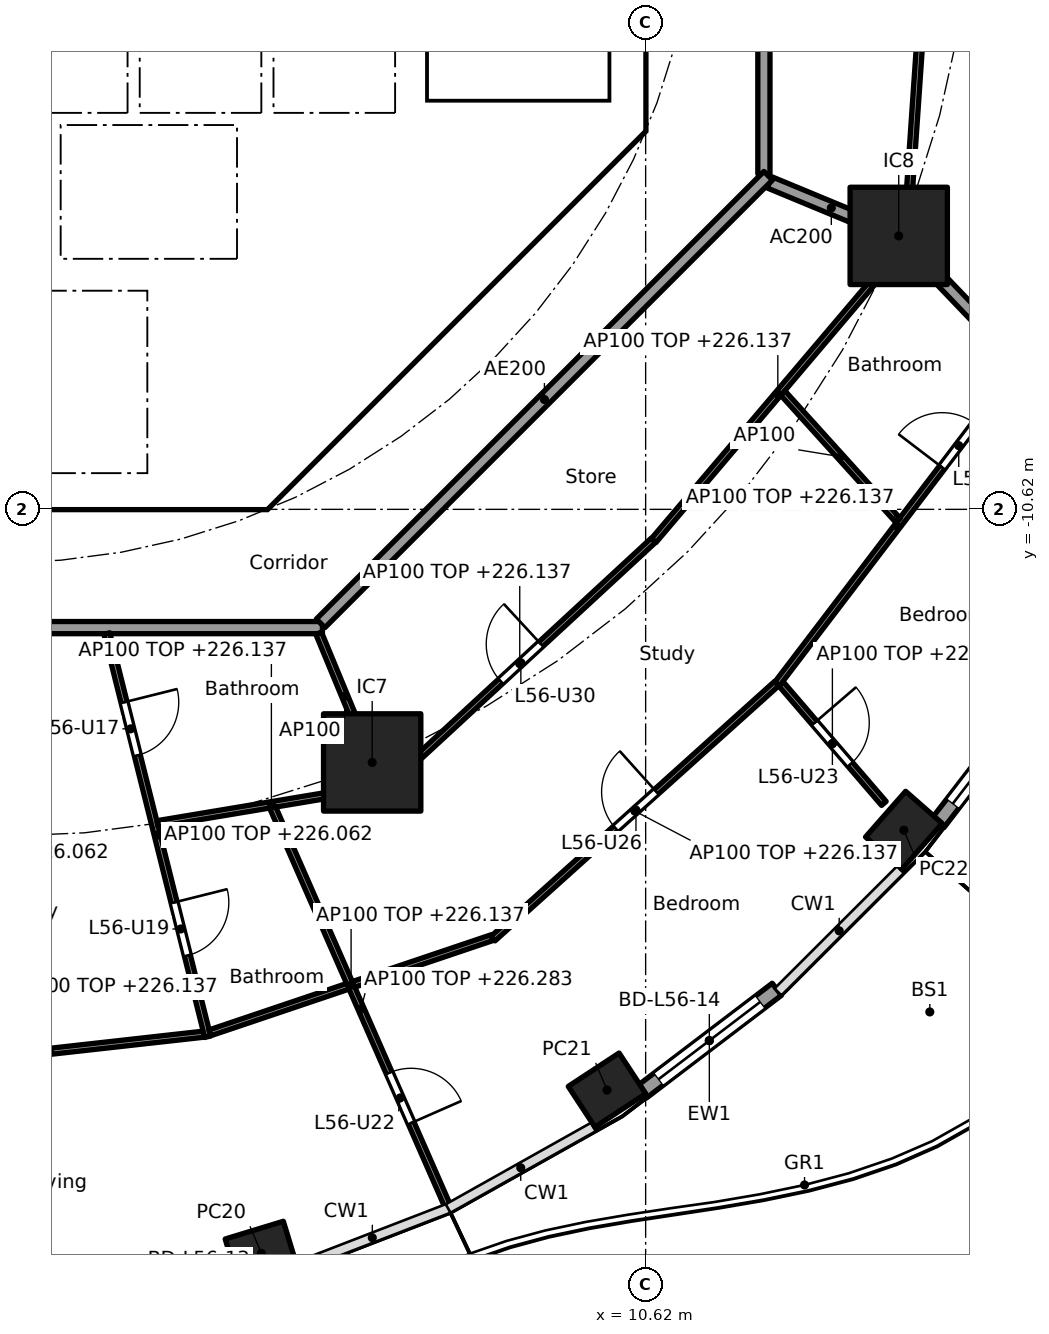
"""IFC4 building model, lengths in metres.
Left out: names, types, materials, properties, quantities, classifications, styles, units other than length and angle.
Written with IfcOpenShell. Run it as: python <this file> out.ifc"""

import sys

from ifc_helpers import new_model, si_unit, direction, frame, frame_2d, origin, origin_2d, place, context, subcontext, project, spatial, polyline, rectangle, hollow_rectangle, outline, extrude, element, fill, save


model = new_model("IFC4")
c1 = context("Model", 3, precision=1e-05, world=origin(), true_north=direction((0.0, 1.0)))
c2 = subcontext(c1, "Body", "Model", "MODEL_VIEW")
j1 = project(units=[si_unit("LENGTHUNIT", "METRE"), si_unit("PLANEANGLEUNIT", "RADIAN")], contexts=[c1])
p1 = place(None, origin())
s1 = spatial("IfcSite", under=j1, at=p1, CompositionType="ELEMENT")
p2 = place(p1, origin())
s2 = spatial("IfcBuilding", under=s1, at=p2, CompositionType="ELEMENT")
p3 = place(p2, frame((0.0, 0.0, 223.3)))
s3 = spatial("IfcBuildingStorey", under=s2, at=p3, CompositionType="ELEMENT", Elevation=223.3)
for number, where, z_axis, x_axis in (
    (1, (4.3, -22.856, 0.0), (0.0, 0.0, 1.0), (0.957, 0.292, 0.0)),
    (2, (9.985, -20.17, 0.0), (0.0, 0.0, 1.0), (0.836, 0.549, 0.0)),
    (3, (14.866, -15.896, 0.0), (0.0, 0.0, 1.0), (0.66, 0.751, 0.0)),
):
    element("IfcColumn", number, at=place(p3, frame(where, z_axis=z_axis, x_axis=x_axis)), inside=s3, PredefinedType="COLUMN", context=c2, shape_type="SweptSolid", body=[
        extrude(hollow_rectangle(XDim=1.0, YDim=0.8, WallThickness=0.032, at=origin_2d()), origin(), (0.0, 0.0, 1.0), 3.7),
    ])
for number, where, z_axis, x_axis in (
    (4, (6.123, -14.782, 0.0), (0.0, 0.0, 1.0), (1.0, 0.0, 0.0)),
    (5, (14.782, -6.123, 0.0), (0.0, 0.0, 1.0), (1.0, 0.0, 0.0)),
):
    element("IfcColumn", number, at=place(p3, frame(where, z_axis=z_axis, x_axis=x_axis)), inside=s3, PredefinedType="COLUMN", context=c2, shape_type="SweptSolid", body=[
        extrude(rectangle(XDim=1.6, YDim=1.6, at=origin_2d()), origin(), (0.0, 0.0, 1.0), 3.7),
    ])
p4 = place(p3, frame((12.777, -18.513, 0.0), z_axis=(0.0, 0.0, 1.0), x_axis=(-0.796022158395, -0.605267480825, 0.0)))
e6 = element("IfcWall", 6, at=p4, inside=s3, PredefinedType="SOLIDWALL", context=c2, shape_type="SweptSolid", body=[
    extrude(rectangle(XDim=2.789, YDim=0.25, at=frame_2d((1.395, 0.0))), origin(), (0.0, 0.0, 1.0), 3.44),
])
p5 = place(p4, frame((0.344, 0.0, 0.0)))
e7 = element("IfcOpeningElement", 7, at=p5, cuts=e6, PredefinedType="OPENING", context=c2, shape_type="SweptSolid", body=[
    extrude(rectangle(XDim=2.1, YDim=2.4, at=frame_2d((1.05, 1.2))), frame((0.0, 0.135, 0.0), z_axis=(0.0, -1.0, 0.0), x_axis=(1.0, 0.0, 0.0)), (0.0, 0.0, 1.0), 0.27),
])
p6 = place(p3, frame((17.197, -13.48, 0.0), z_axis=(0.0, 0.0, 1.0), x_axis=(-0.610438565676, -0.792063607001, 0.0)))
e8 = element("IfcWall", 8, at=p6, inside=s3, PredefinedType="SOLIDWALL", context=c2, shape_type="SweptSolid", body=[
    extrude(rectangle(XDim=2.901, YDim=0.25, at=frame_2d((1.45, 0.0))), origin(), (0.0, 0.0, 1.0), 3.44),
])
p7 = place(p6, frame((0.4, 0.0, 0.0)))
e9 = element("IfcOpeningElement", 9, at=p7, cuts=e8, PredefinedType="OPENING", context=c2, shape_type="SweptSolid", body=[
    extrude(rectangle(XDim=2.1, YDim=2.4, at=frame_2d((1.05, 1.2))), frame((0.0, 0.135, 0.0), z_axis=(0.0, -1.0, 0.0), x_axis=(1.0, 0.0, 0.0)), (0.0, 0.0, 1.0), 0.27),
])
p8 = place(p3, frame((4.613, -9.988, 0.0), z_axis=(0.0, 0.0, 1.0), x_axis=(0.707106781187, 0.707106781187, 0.0)))
e10 = element("IfcWall", 10, at=p8, inside=s3, PredefinedType="SHEAR", context=c2, shape_type="SweptSolid", body=[
    extrude(rectangle(XDim=7.602, YDim=0.6, at=frame_2d((3.801, 0.0))), origin(), (0.0, 0.0, 1.0), 3.44),
])
p9 = place(p8, frame((3.201, 0.0, 0.0)))
e11 = element("IfcOpeningElement", 11, at=p9, cuts=e10, PredefinedType="OPENING", context=c2, shape_type="SweptSolid", body=[
    extrude(rectangle(XDim=1.2, YDim=2.1, at=frame_2d((0.6, 1.05))), frame((0.0, 0.31, 0.0), z_axis=(0.0, -1.0, 0.0), x_axis=(1.0, 0.0, 0.0)), (0.0, 0.0, 1.0), 0.62),
])
p10 = place(p3, frame((4.0, -10.025, 0.0), z_axis=(0.0, 0.0, 1.0), x_axis=(0.0, 1.0, 0.0)))
e12 = element("IfcWall", 12, at=p10, inside=s3, PredefinedType="SOLIDWALL", context=c2, shape_type="SweptSolid", body=[
    extrude(rectangle(XDim=3.0, YDim=0.2, at=frame_2d((1.5, 0.0))), origin(), (0.0, 0.0, 1.0), 3.44),
])
p11 = place(p10, frame((0.975, 0.0, 0.0)))
e13 = element("IfcOpeningElement", 13, at=p11, cuts=e12, PredefinedType="OPENING", context=c2, shape_type="SweptSolid", body=[
    extrude(rectangle(XDim=1.1, YDim=2.1, at=frame_2d((0.55, 1.05))), frame((0.0, 0.11, 0.0), z_axis=(0.0, -1.0, 0.0), x_axis=(1.0, 0.0, 0.0)), (0.0, 0.0, 1.0), 0.22),
])
p12 = place(p3, frame((4.0, -6.5, 0.0), z_axis=(0.0, 0.0, 1.0), x_axis=(0.0, 1.0, 0.0)))
e14 = element("IfcWall", 14, at=p12, inside=s3, PredefinedType="SOLIDWALL", context=c2, shape_type="SweptSolid", body=[
    extrude(rectangle(XDim=2.2, YDim=0.2, at=frame_2d((1.1, 0.0))), origin(), (0.0, 0.0, 1.0), 3.44),
])
p13 = place(p12, frame((0.55, 0.0, 0.0)))
e15 = element("IfcOpeningElement", 15, at=p13, cuts=e14, PredefinedType="OPENING", context=c2, shape_type="SweptSolid", body=[
    extrude(rectangle(XDim=1.1, YDim=2.1, at=frame_2d((0.55, 1.05))), frame((0.0, 0.11, 0.0), z_axis=(0.0, -1.0, 0.0), x_axis=(1.0, 0.0, 0.0)), (0.0, 0.0, 1.0), 0.22),
])
p14 = place(p3, origin())
e16 = element("IfcWall", 16, at=p14, inside=s3, PredefinedType="SHEAR", context=c2, shape_type="SweptSolid", body=[
    extrude(outline(polyline([(-4.152, -10.025), (4.152, -10.025), (4.401, -9.776), (4.825, -10.2), (4.401, -10.625), (-4.401, -10.625), (-4.825, -10.2), (-4.401, -9.776), (-4.152, -10.025)])), origin(), (0.0, 0.0, 1.0), 3.44),
])
p15 = place(p3, origin())
e17 = element("IfcWall", 17, at=p15, inside=s3, PredefinedType="SHEAR", context=c2, shape_type="SweptSolid", body=[
    extrude(outline(polyline([(9.776, -4.401), (10.025, -4.152), (10.025, -3.801), (10.025, 4.152), (9.776, 4.401), (10.2, 4.825), (10.625, 4.401), (10.625, -4.401), (10.2, -4.825), (9.776, -4.401)])), origin(), (0.0, 0.0, 1.0), 3.44),
])
p16 = place(p3, frame((0.9, -6.5, 0.0), z_axis=(0.0, 0.0, 1.0), x_axis=(0.0, 1.0, 0.0)))
e18 = element("IfcWall", 18, at=p16, inside=s3, PredefinedType="SOLIDWALL", context=c2, shape_type="SweptSolid", body=[
    extrude(rectangle(XDim=2.2, YDim=0.2, at=frame_2d((1.1, 0.0))), origin(), (0.0, 0.0, 1.0), 3.44),
])
p17 = place(p3, origin())
e19 = element("IfcWall", 19, at=p17, inside=s3, PredefinedType="SOLIDWALL", context=c2, shape_type="SweptSolid", body=[
    extrude(outline(polyline([(-6.7, -2.1), (-6.5, -2.1), (-6.5, -4.1), (-2.3, -4.1), (-2.3, -2.1), (-2.1, -2.1), (-2.1, -4.1), (-0.1, -4.1), (-0.1, -2.1), (0.1, -2.1), (0.1, -4.1), (2.1, -4.1), (2.1, -2.1), (2.3, -2.1), (2.3, -4.1), (4.3, -4.1), (4.3, -2.1), (4.5, -2.1), (4.5, -4.1), (6.5, -4.1), (6.5, -2.1), (6.7, -2.1), (6.7, -4.3), (-6.7, -4.3), (-6.7, -2.1)])), origin(), (0.0, 0.0, 1.0), 3.44),
])
p18 = place(p3, origin())
e20 = element("IfcWall", 20, at=p18, inside=s3, PredefinedType="SOLIDWALL", context=c2, shape_type="SweptSolid", body=[
    extrude(outline(polyline([(4.1, -7.025), (-4.1, -7.025), (-4.1, -6.5), (4.1, -6.5), (4.1, -7.025)])), origin(), (0.0, 0.0, 1.0), 3.44),
])
p19 = place(p3, origin())
e21 = element("IfcWall", 21, at=p19, inside=s3, PredefinedType="SOLIDWALL", context=c2, shape_type="SweptSolid", body=[
    extrude(outline(polyline([(7.025, -3.9), (6.7, -3.9), (6.7, 3.9), (7.025, 3.9), (7.025, -3.9)])), origin(), (0.0, 0.0, 1.0), 3.44),
])
p20 = place(p3, origin())
e22 = element("IfcWall", 22, at=p20, inside=s3, PredefinedType="SOLIDWALL", context=c2, shape_type="SweptSolid", body=[
    extrude(outline(polyline([(10.025, -4.1), (6.7, -4.1), (6.7, -3.9), (10.025, -3.9), (10.025, -4.1)])), origin(), (0.0, 0.0, 1.0), 3.44),
])
p21 = place(p3, frame((12.657, -5.243, 0.0), z_axis=(0.0, 0.0, 1.0), x_axis=(0.923853160736, -0.382747093259, 0.0)))
e23 = element("IfcWall", 23, at=p21, inside=s3, PredefinedType="PARTITIONING", context=c2, shape_type="SweptSolid", body=[
    extrude(rectangle(XDim=2.2, YDim=0.2, at=frame_2d((1.1, 0.0))), origin(), (0.0, 0.0, 1.0), 3.44),
])
p22 = place(p3, frame((14.817, -6.159, 0.0), z_axis=(0.0, 0.0, 1.0), x_axis=(0.691437669875, -0.722436120828, 0.0)))
e24 = element("IfcWall", 24, at=p22, inside=s3, PredefinedType="PARTITIONING", context=c2, shape_type="SweptSolid", body=[
    extrude(rectangle(XDim=5.104, YDim=0.2, at=frame_2d((2.552, 0.0))), origin(), (0.0, 0.0, 1.0), 3.44),
])
p23 = place(p3, frame((12.565, -5.104, 0.0), z_axis=(0.0, 0.0, 1.0), x_axis=(0.0, 1.0, 0.0)))
e25 = element("IfcWall", 25, at=p23, inside=s3, PredefinedType="PARTITIONING", context=c2, shape_type="SweptSolid", body=[
    extrude(rectangle(XDim=10.209, YDim=0.2, at=frame_2d((5.104, 0.0))), origin(), (0.0, 0.0, 1.0), 3.44),
])
p24 = place(p3, frame((-5.104, -12.565, 0.0), z_axis=(0.0, 0.0, 1.0), x_axis=(1.0, 0.0, 0.0)))
e26 = element("IfcWall", 26, at=p24, inside=s3, PredefinedType="PARTITIONING", context=c2, shape_type="SweptSolid", body=[
    extrude(rectangle(XDim=10.409, YDim=0.2, at=frame_2d((5.205, 0.0))), origin(), (0.0, 0.0, 1.0), 3.44),
])
p25 = place(p24, frame((4.604, 0.0, 0.0)))
e27 = element("IfcOpeningElement", 27, at=p25, cuts=e26, PredefinedType="OPENING", context=c2, shape_type="SweptSolid", body=[
    extrude(rectangle(XDim=1.0, YDim=2.1, at=frame_2d((0.5, 1.05))), frame((0.0, 0.11, 0.0), z_axis=(0.0, -1.0, 0.0), x_axis=(1.0, 0.0, 0.0)), (0.0, 0.0, 1.0), 0.22),
])
p26 = place(p3, frame((5.275, -12.494, 0.0), z_axis=(0.0, 0.0, 1.0), x_axis=(0.707106781187, 0.707106781187, 0.0)))
e28 = element("IfcWall", 28, at=p26, inside=s3, PredefinedType="PARTITIONING", context=c2, shape_type="SweptSolid", body=[
    extrude(rectangle(XDim=10.409, YDim=0.2, at=frame_2d((5.205, 0.0))), origin(), (0.0, 0.0, 1.0), 3.44),
])
p27 = place(p3, frame((15.48, 2.199, 0.0), z_axis=(0.0, 0.0, 1.0), x_axis=(-0.068558685949, -0.997647085186, 0.0)))
e29 = element("IfcWall", 29, at=p27, inside=s3, PredefinedType="PARTITIONING", context=c2, shape_type="SweptSolid", body=[
    extrude(rectangle(XDim=8.365, YDim=0.1, at=frame_2d((4.183, 0.0))), origin(), (0.0, 0.0, 1.0), 2.837),
])
p28 = place(p27, frame((0.74, 0.0, 0.0)))
e30 = element("IfcOpeningElement", 30, at=p28, cuts=e29, PredefinedType="OPENING", context=c2, shape_type="SweptSolid", body=[
    extrude(rectangle(XDim=0.9, YDim=2.1, at=frame_2d((0.45, 1.05))), frame((0.0, 0.06, 0.0), z_axis=(0.0, -1.0, 0.0), x_axis=(1.0, 0.0, 0.0)), (0.0, 0.0, 1.0), 0.12),
])
p29 = place(p3, frame((-1.726, -19.818, 0.0), z_axis=(0.0, 0.0, 1.0), x_axis=(0.99381893047, 0.111013212902, 0.0)))
e31 = element("IfcWall", 31, at=p29, inside=s3, PredefinedType="PARTITIONING", context=c2, shape_type="SweptSolid", body=[
    extrude(rectangle(XDim=5.113, YDim=0.1, at=frame_2d((2.557, 0.0))), origin(), (0.0, 0.0, 1.0), 2.837),
])
p30 = place(p3, frame((1.759, -12.662, 0.0), z_axis=(0.0, 0.0, 1.0), x_axis=(0.242653275363, -0.970113079984, 0.0)))
e32 = element("IfcWall", 32, at=p30, inside=s3, PredefinedType="PARTITIONING", context=c2, shape_type="SweptSolid", body=[
    extrude(rectangle(XDim=6.836, YDim=0.1, at=frame_2d((3.418, 0.0))), origin(), (0.0, 0.0, 1.0), 2.762),
])
p31 = place(p30, frame((1.166, 0.0, 0.0)))
e33 = element("IfcOpeningElement", 33, at=p31, cuts=e32, PredefinedType="OPENING", context=c2, shape_type="SweptSolid", body=[
    extrude(rectangle(XDim=0.9, YDim=2.1, at=frame_2d((0.45, 1.05))), frame((0.0, 0.06, 0.0), z_axis=(0.0, -1.0, 0.0), x_axis=(1.0, 0.0, 0.0)), (0.0, 0.0, 1.0), 0.12),
])
p32 = place(p30, frame((4.559, 0.0, 0.0)))
e34 = element("IfcOpeningElement", 34, at=p32, cuts=e32, PredefinedType="OPENING", context=c2, shape_type="SweptSolid", body=[
    extrude(rectangle(XDim=0.9, YDim=2.1, at=frame_2d((0.45, 1.05))), frame((0.0, 0.06, 0.0), z_axis=(0.0, -1.0, 0.0), x_axis=(1.0, 0.0, 0.0)), (0.0, 0.0, 1.0), 0.12),
])
p33 = place(p3, frame((2.593, -15.789, 0.0), z_axis=(0.0, 0.0, 1.0), x_axis=(0.986381756816, 0.164471972749, 0.0)))
e35 = element("IfcWall", 35, at=p33, inside=s3, PredefinedType="PARTITIONING", context=c2, shape_type="SweptSolid", body=[
    extrude(rectangle(XDim=3.797, YDim=0.1, at=frame_2d((1.898, 0.0))), origin(), (0.0, 0.0, 1.0), 2.837),
])
p34 = place(p3, frame((3.453, -19.229, 0.0), z_axis=(0.0, 0.0, 1.0), x_axis=(0.947572025416, 0.319542261133, 0.0)))
e36 = element("IfcWall", 36, at=p34, inside=s3, PredefinedType="PARTITIONING", context=c2, shape_type="SweptSolid", body=[
    extrude(rectangle(XDim=4.903, YDim=0.1, at=frame_2d((2.451, 0.0))), origin(), (0.0, 0.0, 1.0), 2.837),
])
p35 = place(p3, frame((4.485, -15.522, 0.0), z_axis=(0.0, 0.0, 1.0), x_axis=(0.401959715825, -0.915657352318, 0.0)))
e37 = element("IfcWall", 37, at=p35, inside=s3, PredefinedType="PARTITIONING", context=c2, shape_type="SweptSolid", body=[
    extrude(rectangle(XDim=7.239, YDim=0.1, at=frame_2d((3.619, 0.0))), origin(), (0.0, 0.0, 1.0), 2.983),
])
p36 = place(p35, frame((4.767, 0.0, 0.0)))
e38 = element("IfcOpeningElement", 38, at=p36, cuts=e37, PredefinedType="OPENING", context=c2, shape_type="SweptSolid", body=[
    extrude(rectangle(XDim=0.9, YDim=2.1, at=frame_2d((0.45, 1.05))), frame((0.0, 0.06, 0.0), z_axis=(0.0, -1.0, 0.0), x_axis=(1.0, 0.0, 0.0)), (0.0, 0.0, 1.0), 0.12),
])
p37 = place(p3, frame((5.243, -12.657, 0.0), z_axis=(0.0, 0.0, 1.0), x_axis=(0.382719158442, -0.923864733477, 0.0)))
e39 = element("IfcWall", 39, at=p37, inside=s3, PredefinedType="PARTITIONING", context=c2, shape_type="SweptSolid", body=[
    extrude(rectangle(XDim=2.25, YDim=0.1, at=frame_2d((1.125, 0.0))), origin(), (0.0, 0.0, 1.0), 3.44),
])
p38 = place(p3, frame((6.351, -15.19, 0.0), z_axis=(0.0, 0.0, 1.0), x_axis=(0.73462674599, 0.678471476243, 0.0)))
e40 = element("IfcWall", 40, at=p38, inside=s3, PredefinedType="PARTITIONING", context=c2, shape_type="SweptSolid", body=[
    extrude(rectangle(XDim=5.987, YDim=0.1, at=frame_2d((2.993, 0.0))), origin(), (0.0, 0.0, 1.0), 2.837),
])
p39 = place(p38, frame((2.568, 0.0, 0.0)))
e41 = element("IfcOpeningElement", 41, at=p39, cuts=e40, PredefinedType="OPENING", context=c2, shape_type="SweptSolid", body=[
    extrude(rectangle(XDim=0.9, YDim=2.1, at=frame_2d((0.45, 1.05))), frame((0.0, 0.06, 0.0), z_axis=(0.0, -1.0, 0.0), x_axis=(1.0, 0.0, 0.0)), (0.0, 0.0, 1.0), 0.12),
])
p40 = place(p3, frame((8.109, -17.679, 0.0), z_axis=(0.0, 0.0, 1.0), x_axis=(0.743675165651, 0.668541134108, 0.0)))
e42 = element("IfcWall", 42, at=p40, inside=s3, PredefinedType="PARTITIONING", context=c2, shape_type="SweptSolid", body=[
    extrude(rectangle(XDim=6.275, YDim=0.1, at=frame_2d((3.137, 0.0))), origin(), (0.0, 0.0, 1.0), 2.837),
])
p41 = place(p40, frame((2.712, 0.0, 0.0)))
e43 = element("IfcOpeningElement", 43, at=p41, cuts=e42, PredefinedType="OPENING", context=c2, shape_type="SweptSolid", body=[
    extrude(rectangle(XDim=0.9, YDim=2.1, at=frame_2d((0.45, 1.05))), frame((0.0, 0.06, 0.0), z_axis=(0.0, -1.0, 0.0), x_axis=(1.0, 0.0, 0.0)), (0.0, 0.0, 1.0), 0.12),
])
p42 = place(p3, frame((10.753, -11.132, 0.0), z_axis=(0.0, 0.0, 1.0), x_axis=(0.646987675252, 0.762500457752, 0.0)))
e44 = element("IfcWall", 44, at=p42, inside=s3, PredefinedType="PARTITIONING", context=c2, shape_type="SweptSolid", body=[
    extrude(rectangle(XDim=6.309, YDim=0.1, at=frame_2d((3.154, 0.0))), origin(), (0.0, 0.0, 1.0), 2.837),
])
p43 = place(p3, frame((12.845, -13.489, 0.0), z_axis=(0.0, 0.0, 1.0), x_axis=(0.652092276587, -0.758139606416, 0.0)))
e45 = element("IfcWall", 45, at=p43, inside=s3, PredefinedType="PARTITIONING", context=c2, shape_type="SweptSolid", body=[
    extrude(rectangle(XDim=2.594, YDim=0.1, at=frame_2d((1.297, 0.0))), origin(), (0.0, 0.0, 1.0), 2.837),
])
p44 = place(p43, frame((0.847, 0.0, 0.0)))
e46 = element("IfcOpeningElement", 46, at=p44, cuts=e45, PredefinedType="OPENING", context=c2, shape_type="SweptSolid", body=[
    extrude(rectangle(XDim=0.9, YDim=2.1, at=frame_2d((0.45, 1.05))), frame((0.0, 0.06, 0.0), z_axis=(0.0, -1.0, 0.0), x_axis=(1.0, 0.0, 0.0)), (0.0, 0.0, 1.0), 0.12),
])
p45 = place(p3, frame((12.782, -13.491, 0.0), z_axis=(0.0, 0.0, 1.0), x_axis=(0.606141365852, 0.79535692906, 0.0)))
e47 = element("IfcWall", 47, at=p45, inside=s3, PredefinedType="PARTITIONING", context=c2, shape_type="SweptSolid", body=[
    extrude(rectangle(XDim=6.52, YDim=0.1, at=frame_2d((3.26, 0.0))), origin(), (0.0, 0.0, 1.0), 2.837),
])
p46 = place(p45, frame((4.477, 0.0, 0.0)))
e48 = element("IfcOpeningElement", 48, at=p46, cuts=e47, PredefinedType="OPENING", context=c2, shape_type="SweptSolid", body=[
    extrude(rectangle(XDim=0.9, YDim=2.1, at=frame_2d((0.45, 1.05))), frame((0.0, 0.06, 0.0), z_axis=(0.0, -1.0, 0.0), x_axis=(1.0, 0.0, 0.0)), (0.0, 0.0, 1.0), 0.12),
])
p47 = place(p3, frame((12.876, -8.707, 0.0), z_axis=(0.0, 0.0, 1.0), x_axis=(0.670768418052, -0.741666858733, 0.0)))
e49 = element("IfcWall", 49, at=p47, inside=s3, PredefinedType="PARTITIONING", context=c2, shape_type="SweptSolid", body=[
    extrude(rectangle(XDim=2.824, YDim=0.1, at=frame_2d((1.412, 0.0))), origin(), (0.0, 0.0, 1.0), 3.44),
])
p48 = place(p5, origin())
e50 = element("IfcDoor", 50, at=p48, inside=s3, OperationType="SLIDING_TO_LEFT", PredefinedType="DOOR", context=c2, shape_type="SweptSolid", body=[
    extrude(rectangle(XDim=2.1, YDim=2.4, at=frame_2d((1.05, 1.2))), frame((0.0, 0.025, 0.0), z_axis=(0.0, -1.0, 0.0), x_axis=(1.0, 0.0, 0.0)), (0.0, 0.0, 1.0), 0.05),
])
fill(e7, e50)
p49 = place(p7, origin())
e51 = element("IfcDoor", 51, at=p49, inside=s3, OperationType="SLIDING_TO_LEFT", PredefinedType="DOOR", context=c2, shape_type="SweptSolid", body=[
    extrude(rectangle(XDim=2.1, YDim=2.4, at=frame_2d((1.05, 1.2))), frame((0.0, 0.025, 0.0), z_axis=(0.0, -1.0, 0.0), x_axis=(1.0, 0.0, 0.0)), (0.0, 0.0, 1.0), 0.05),
])
fill(e9, e51)
p50 = place(p13, origin())
e52 = element("IfcDoor", 52, at=p50, inside=s3, OperationType="DOUBLE_DOOR_SLIDING", PredefinedType="DOOR", context=c2, shape_type="SweptSolid", body=[
    extrude(rectangle(XDim=1.1, YDim=2.1, at=frame_2d((0.55, 1.05))), frame((0.0, 0.025, 0.0), z_axis=(0.0, -1.0, 0.0), x_axis=(1.0, 0.0, 0.0)), (0.0, 0.0, 1.0), 0.05),
])
fill(e15, e52)
p51 = place(p11, origin())
e53 = element("IfcDoor", 53, at=p51, inside=s3, OperationType="SINGLE_SWING_RIGHT", PredefinedType="DOOR", context=c2, shape_type="SweptSolid", body=[
    extrude(rectangle(XDim=1.1, YDim=2.1, at=frame_2d((0.55, 1.05))), frame((0.0, 0.025, 0.0), z_axis=(0.0, -1.0, 0.0), x_axis=(1.0, 0.0, 0.0)), (0.0, 0.0, 1.0), 0.05),
])
fill(e13, e53)
p52 = place(p9, origin())
e54 = element("IfcDoor", 54, at=p52, inside=s3, OperationType="SINGLE_SWING_LEFT", PredefinedType="DOOR", context=c2, shape_type="SweptSolid", body=[
    extrude(rectangle(XDim=1.2, YDim=2.1, at=frame_2d((0.6, 1.05))), frame((0.0, 0.025, 0.0), z_axis=(0.0, -1.0, 0.0), x_axis=(1.0, 0.0, 0.0)), (0.0, 0.0, 1.0), 0.05),
])
fill(e11, e54)
p53 = place(p31, origin())
e55 = element("IfcDoor", 55, at=p53, inside=s3, OperationType="SINGLE_SWING_LEFT", PredefinedType="DOOR", context=c2, shape_type="SweptSolid", body=[
    extrude(rectangle(XDim=0.9, YDim=2.1, at=frame_2d((0.45, 1.05))), frame((0.0, 0.025, 0.0), z_axis=(0.0, -1.0, 0.0), x_axis=(1.0, 0.0, 0.0)), (0.0, 0.0, 1.0), 0.05),
])
fill(e33, e55)
p54 = place(p32, origin())
e56 = element("IfcDoor", 56, at=p54, inside=s3, OperationType="SINGLE_SWING_LEFT", PredefinedType="DOOR", context=c2, shape_type="SweptSolid", body=[
    extrude(rectangle(XDim=0.9, YDim=2.1, at=frame_2d((0.45, 1.05))), frame((0.0, 0.025, 0.0), z_axis=(0.0, -1.0, 0.0), x_axis=(1.0, 0.0, 0.0)), (0.0, 0.0, 1.0), 0.05),
])
fill(e34, e56)
p55 = place(p36, origin())
e57 = element("IfcDoor", 57, at=p55, inside=s3, OperationType="SINGLE_SWING_RIGHT", PredefinedType="DOOR", context=c2, shape_type="SweptSolid", body=[
    extrude(rectangle(XDim=0.9, YDim=2.1, at=frame_2d((0.45, 1.05))), frame((0.0, 0.025, 0.0), z_axis=(0.0, -1.0, 0.0), x_axis=(1.0, 0.0, 0.0)), (0.0, 0.0, 1.0), 0.05),
])
fill(e38, e57)
p56 = place(p44, origin())
e58 = element("IfcDoor", 58, at=p56, inside=s3, OperationType="SINGLE_SWING_LEFT", PredefinedType="DOOR", context=c2, shape_type="SweptSolid", body=[
    extrude(rectangle(XDim=0.9, YDim=2.1, at=frame_2d((0.45, 1.05))), frame((0.0, 0.025, 0.0), z_axis=(0.0, -1.0, 0.0), x_axis=(1.0, 0.0, 0.0)), (0.0, 0.0, 1.0), 0.05),
])
fill(e46, e58)
p57 = place(p41, origin())
e59 = element("IfcDoor", 59, at=p57, inside=s3, OperationType="SINGLE_SWING_RIGHT", PredefinedType="DOOR", context=c2, shape_type="SweptSolid", body=[
    extrude(rectangle(XDim=0.9, YDim=2.1, at=frame_2d((0.45, 1.05))), frame((0.0, 0.025, 0.0), z_axis=(0.0, -1.0, 0.0), x_axis=(1.0, 0.0, 0.0)), (0.0, 0.0, 1.0), 0.05),
])
fill(e43, e59)
p58 = place(p46, origin())
e60 = element("IfcDoor", 60, at=p58, inside=s3, OperationType="SINGLE_SWING_LEFT", PredefinedType="DOOR", context=c2, shape_type="SweptSolid", body=[
    extrude(rectangle(XDim=0.9, YDim=2.1, at=frame_2d((0.45, 1.05))), frame((0.0, 0.025, 0.0), z_axis=(0.0, -1.0, 0.0), x_axis=(1.0, 0.0, 0.0)), (0.0, 0.0, 1.0), 0.05),
])
fill(e48, e60)
p59 = place(p39, origin())
e61 = element("IfcDoor", 61, at=p59, inside=s3, OperationType="SINGLE_SWING_RIGHT", PredefinedType="DOOR", context=c2, shape_type="SweptSolid", body=[
    extrude(rectangle(XDim=0.9, YDim=2.1, at=frame_2d((0.45, 1.05))), frame((0.0, 0.025, 0.0), z_axis=(0.0, -1.0, 0.0), x_axis=(1.0, 0.0, 0.0)), (0.0, 0.0, 1.0), 0.05),
])
fill(e41, e61)
save(model, sys.argv[1])
